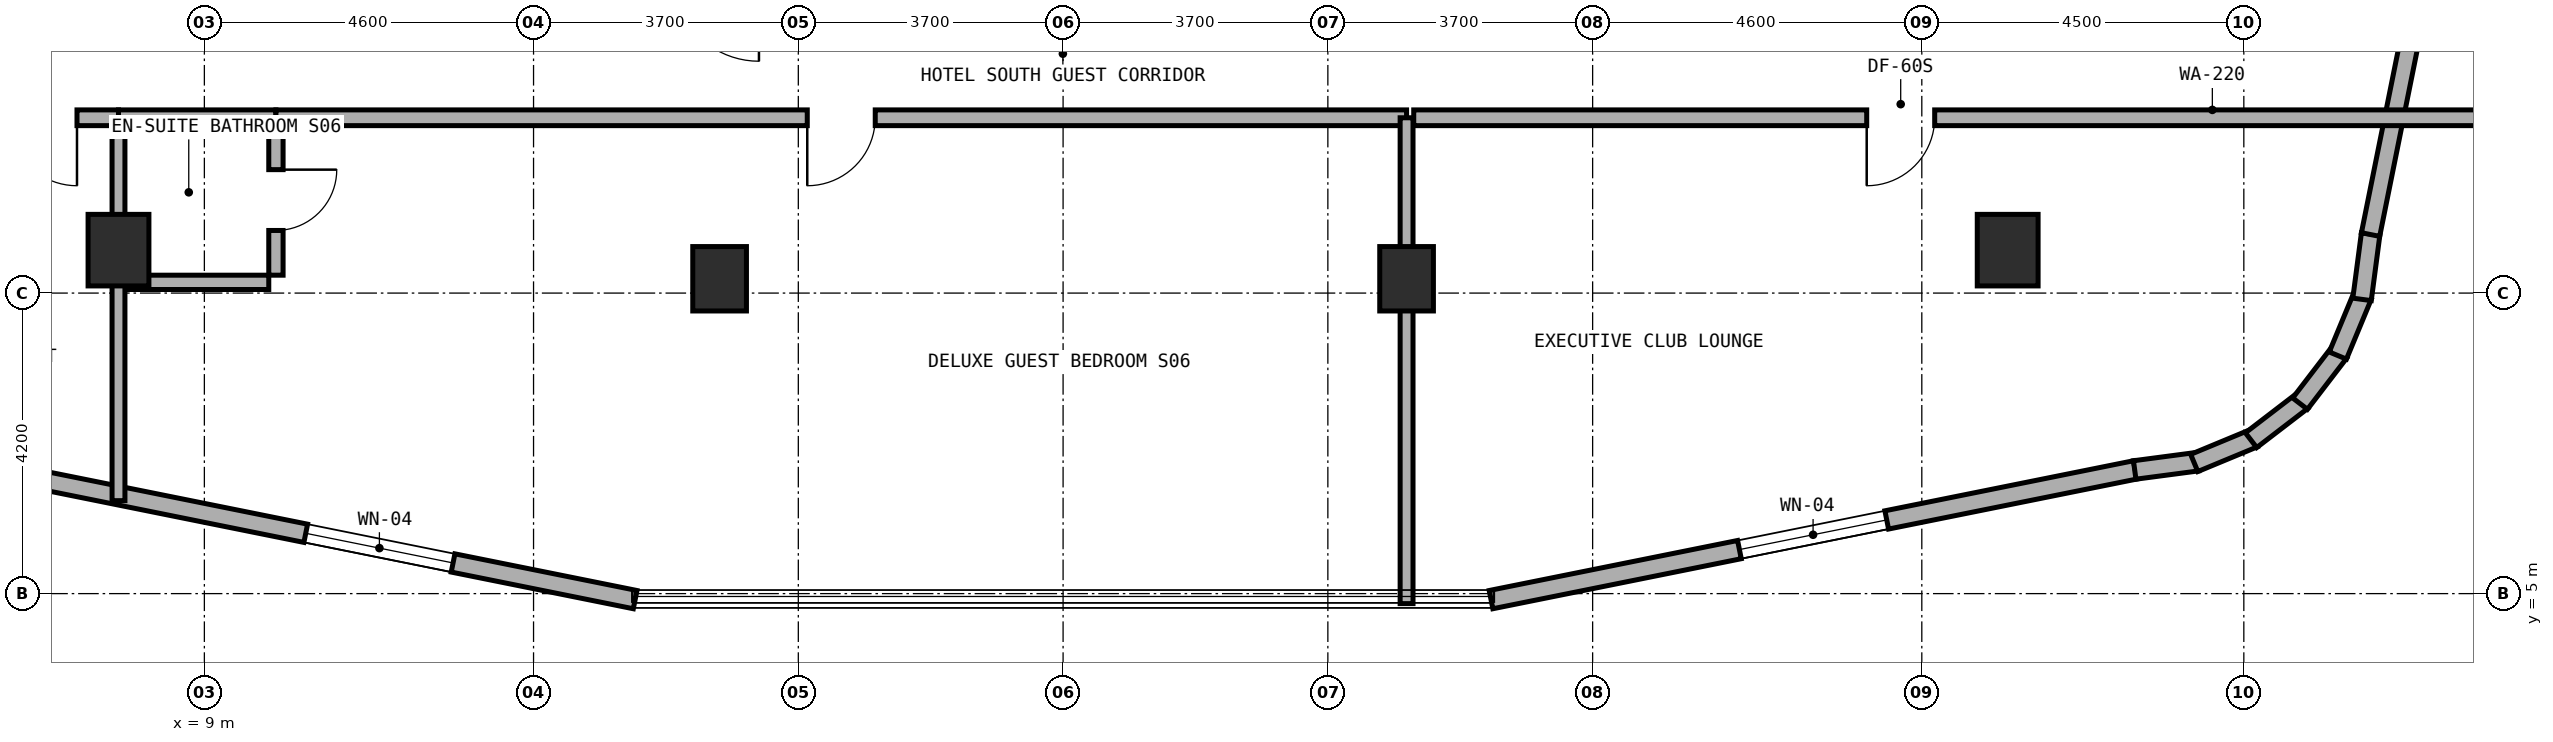
"""IFC4 building model, lengths in metres.
Left out: names, types, materials, properties, quantities, classifications, styles, units other than length and angle.
Written with IfcOpenShell. Run it as: python <this file> out.ifc"""

import sys

from ifc_helpers import new_model, si_unit, direction, frame, frame_2d, origin, origin_2d, place, context, subcontext, project, spatial, rectangle, extrude, element, fill, save


model = new_model("IFC4")
c1 = context("Model", 3, precision=1e-05, world=origin(), true_north=direction((0.0, 1.0)))
c2 = subcontext(c1, "Body", "Model", "MODEL_VIEW")
j1 = project(units=[si_unit("LENGTHUNIT", "METRE"), si_unit("PLANEANGLEUNIT", "RADIAN")], contexts=[c1])
p1 = place(None, origin())
s1 = spatial("IfcSite", under=j1, at=p1, CompositionType="ELEMENT")
p2 = place(p1, origin())
s2 = spatial("IfcBuilding", under=s1, at=p2, CompositionType="ELEMENT")
p3 = place(p2, frame((0.0, 0.0, 152.0)))
s3 = spatial("IfcBuildingStorey", under=s2, at=p3, CompositionType="ELEMENT", Elevation=152.0)
for number, where, z_axis, x_axis in (
    (1, (16.2, 9.4, 0.0), (0.0, 0.0, 1.0), (1.0, 0.0, 0.0)),
    (2, (25.8, 9.4, 0.0), (0.0, 0.0, 1.0), (1.0, 0.0, 0.0)),
):
    element("IfcColumn", number, at=place(p3, frame(where, z_axis=z_axis, x_axis=x_axis)), inside=s3, PredefinedType="COLUMN", context=c2, shape_type="SweptSolid", body=[
        extrude(rectangle(XDim=0.75, YDim=0.9, at=origin_2d()), origin(), (0.0, 0.0, 1.0), 3.5),
    ])
for number, where, z_axis, x_axis in (
    (3, (7.8, 9.8, 0.0), (0.0, 0.0, 1.0), (1.0, 0.0, 0.0)),
    (4, (34.2, 9.8, 0.0), (0.0, 0.0, 1.0), (1.0, 0.0, 0.0)),
):
    element("IfcColumn", number, at=place(p3, frame(where, z_axis=z_axis, x_axis=x_axis)), inside=s3, PredefinedType="COLUMN", context=c2, shape_type="SweptSolid", body=[
        extrude(rectangle(XDim=0.85, YDim=1.0, at=origin_2d()), origin(), (0.0, 0.0, 1.0), 3.5),
    ])
p4 = place(p3, frame((6.018, 6.729, 0.0), z_axis=(0.0, 0.0, 1.0), x_axis=(0.980315963543, -0.197435082048, 0.0)))
e5 = element("IfcWall", 5, at=p4, inside=s3, PredefinedType="STANDARD", context=c2, shape_type="SweptSolid", body=[
    extrude(rectangle(XDim=9.183, YDim=0.26, at=frame_2d((4.591, 0.0))), origin(), (0.0, 0.0, 1.0), 3.22),
])
p5 = place(p4, frame((4.487, 0.0, 0.85)))
e6 = element("IfcOpeningElement", 6, at=p5, cuts=e5, PredefinedType="OPENING", context=c2, shape_type="SweptSolid", body=[
    extrude(rectangle(XDim=2.1, YDim=1.5, at=frame_2d((1.05, 0.75))), frame((0.0, 0.14, 0.0), z_axis=(0.0, -1.0, 0.0), x_axis=(1.0, 0.0, 0.0)), (0.0, 0.0, 1.0), 0.28),
])
p6 = place(p3, frame((26.98, 4.916, 0.0), z_axis=(0.0, 0.0, 1.0), x_axis=(0.980315963543, 0.197435082048, 0.0)))
e7 = element("IfcWall", 7, at=p6, inside=s3, PredefinedType="STANDARD", context=c2, shape_type="SweptSolid", body=[
    extrude(rectangle(XDim=9.183, YDim=0.26, at=frame_2d((4.591, 0.0))), origin(), (0.0, 0.0, 1.0), 3.22),
])
p7 = place(p6, frame((3.541, 0.0, 0.85)))
e8 = element("IfcOpeningElement", 8, at=p7, cuts=e7, PredefinedType="OPENING", context=c2, shape_type="SweptSolid", body=[
    extrude(rectangle(XDim=2.1, YDim=1.5, at=frame_2d((1.05, 0.75))), frame((0.0, 0.14, 0.0), z_axis=(0.0, -1.0, 0.0), x_axis=(1.0, 0.0, 0.0)), (0.0, 0.0, 1.0), 0.28),
])
p8 = place(p3, frame((35.975, 6.728, 0.0), z_axis=(0.0, 0.0, 1.0), x_axis=(0.991388484223, 0.130953706898, 0.0)))
e9 = element("IfcWall", 9, at=p8, inside=s3, PredefinedType="STANDARD", context=c2, shape_type="SweptSolid", body=[
    extrude(rectangle(XDim=0.885, YDim=0.26, at=frame_2d((0.443, 0.0))), origin(), (0.0, 0.0, 1.0), 3.22),
])
p9 = place(p3, frame((36.807, 6.826, 0.0), z_axis=(0.0, 0.0, 1.0), x_axis=(0.923627776508, 0.383290660547, 0.0)))
e10 = element("IfcWall", 10, at=p9, inside=s3, PredefinedType="STANDARD", context=c2, shape_type="SweptSolid", body=[
    extrude(rectangle(XDim=0.903, YDim=0.26, at=frame_2d((0.452, 0.0))), origin(), (0.0, 0.0, 1.0), 3.22),
])
p10 = place(p3, frame((37.601, 7.144, 0.0), z_axis=(0.0, 0.0, 1.0), x_axis=(0.793458244748, 0.608624690463, 0.0)))
e11 = element("IfcWall", 11, at=p10, inside=s3, PredefinedType="STANDARD", context=c2, shape_type="SweptSolid", body=[
    extrude(rectangle(XDim=0.902, YDim=0.26, at=frame_2d((0.451, 0.0))), origin(), (0.0, 0.0, 1.0), 3.22),
])
p11 = place(p3, frame((38.286, 7.655, 0.0), z_axis=(0.0, 0.0, 1.0), x_axis=(0.608494022858, 0.793558456666, 0.0)))
e12 = element("IfcWall", 12, at=p11, inside=s3, PredefinedType="STANDARD", context=c2, shape_type="SweptSolid", body=[
    extrude(rectangle(XDim=0.902, YDim=0.26, at=frame_2d((0.451, 0.0))), origin(), (0.0, 0.0, 1.0), 3.22),
])
p12 = place(p3, frame((38.814, 8.327, 0.0), z_axis=(0.0, 0.0, 1.0), x_axis=(0.383155708213, 0.923683767999, 0.0)))
e13 = element("IfcWall", 13, at=p12, inside=s3, PredefinedType="STANDARD", context=c2, shape_type="SweptSolid", body=[
    extrude(rectangle(XDim=0.903, YDim=0.26, at=frame_2d((0.451, 0.0))), origin(), (0.0, 0.0, 1.0), 3.22),
])
p13 = place(p3, frame((39.152, 9.112, 0.0), z_axis=(0.0, 0.0, 1.0), x_axis=(0.130200706103, 0.991487658083, 0.0)))
e14 = element("IfcWall", 14, at=p13, inside=s3, PredefinedType="STANDARD", context=c2, shape_type="SweptSolid", body=[
    extrude(rectangle(XDim=0.921, YDim=0.26, at=frame_2d((0.46, 0.0))), origin(), (0.0, 0.0, 1.0), 3.22),
])
p14 = place(p3, frame((39.271, 10.018, 0.0), z_axis=(0.0, 0.0, 1.0), x_axis=(0.197435082048, 0.980315963543, 0.0)))
e15 = element("IfcWall", 15, at=p14, inside=s3, PredefinedType="STANDARD", context=c2, shape_type="SweptSolid", body=[
    extrude(rectangle(XDim=9.183, YDim=0.26, at=frame_2d((4.591, 0.0))), origin(), (0.0, 0.0, 1.0), 3.22),
])
p15 = place(p14, frame((5.349, 0.0, 0.85)))
e16 = element("IfcOpeningElement", 16, at=p15, cuts=e15, PredefinedType="OPENING", context=c2, shape_type="SweptSolid", body=[
    extrude(rectangle(XDim=2.1, YDim=1.5, at=frame_2d((1.05, 0.75))), frame((0.0, 0.14, 0.0), z_axis=(0.0, -1.0, 0.0), x_axis=(1.0, 0.0, 0.0)), (0.0, 0.0, 1.0), 0.28),
])
p16 = place(p3, frame((5.55, 11.65, 0.0), z_axis=(0.0, 0.0, 1.0), x_axis=(1.0, 0.0, 0.0)))
e17 = element("IfcWall", 17, at=p16, inside=s3, PredefinedType="SOLIDWALL", context=c2, shape_type="SweptSolid", body=[
    extrude(rectangle(XDim=2.25, YDim=0.22, at=frame_2d((1.125, 0.0))), origin(), (0.0, 0.0, 1.0), 2.795),
])
p17 = place(p16, frame((0.72, 0.0, 0.0)))
e18 = element("IfcOpeningElement", 18, at=p17, cuts=e17, PredefinedType="OPENING", context=c2, shape_type="SweptSolid", body=[
    extrude(rectangle(XDim=0.95, YDim=2.1, at=frame_2d((0.475, 1.05))), frame((0.0, 0.12, 0.0), z_axis=(0.0, -1.0, 0.0), x_axis=(1.0, 0.0, 0.0)), (0.0, 0.0, 1.0), 0.24),
])
p18 = place(p3, frame((7.8, 6.299, 0.0), z_axis=(0.0, 0.0, 1.0), x_axis=(0.0, 1.0, 0.0)))
e19 = element("IfcWall", 19, at=p18, inside=s3, PredefinedType="SOLIDWALL", context=c2, shape_type="SweptSolid", body=[
    extrude(rectangle(XDim=5.351, YDim=0.18, at=frame_2d((2.675, 0.0))), origin(), (0.0, 0.0, 1.0), 2.795),
])
p19 = place(p3, frame((10.0, 9.45, 0.0), z_axis=(0.0, 0.0, 1.0), x_axis=(0.0, 1.0, 0.0)))
e20 = element("IfcWall", 20, at=p19, inside=s3, PredefinedType="PLUMBINGWALL", context=c2, shape_type="SweptSolid", body=[
    extrude(rectangle(XDim=2.1, YDim=0.2, at=frame_2d((1.05, 0.0))), origin(), (0.0, 0.0, 1.0), 2.745),
])
p20 = place(p19, frame((0.625, 0.0, 0.0)))
e21 = element("IfcOpeningElement", 21, at=p20, cuts=e20, PredefinedType="OPENING", context=c2, shape_type="SweptSolid", body=[
    extrude(rectangle(XDim=0.85, YDim=2.1, at=frame_2d((0.425, 1.05))), frame((0.0, 0.11, 0.0), z_axis=(0.0, -1.0, 0.0), x_axis=(1.0, 0.0, 0.0)), (0.0, 0.0, 1.0), 0.22),
])
p21 = place(p3, frame((7.9, 9.35, 0.0), z_axis=(0.0, 0.0, 1.0), x_axis=(1.0, 0.0, 0.0)))
e22 = element("IfcWall", 22, at=p21, inside=s3, PredefinedType="PLUMBINGWALL", context=c2, shape_type="SweptSolid", body=[
    extrude(rectangle(XDim=2.0, YDim=0.2, at=frame_2d((1.0, 0.0))), origin(), (0.0, 0.0, 1.0), 3.22),
])
p22 = place(p3, frame((7.8, 11.65, 0.0), z_axis=(0.0, 0.0, 1.0), x_axis=(1.0, 0.0, 0.0)))
e23 = element("IfcWall", 23, at=p22, inside=s3, PredefinedType="SOLIDWALL", context=c2, shape_type="SweptSolid", body=[
    extrude(rectangle(XDim=2.2, YDim=0.22, at=frame_2d((1.1, 0.0))), origin(), (0.0, 0.0, 1.0), 2.795),
])
p23 = place(p3, frame((10.0, 11.65, 0.0), z_axis=(0.0, 0.0, 1.0), x_axis=(1.0, 0.0, 0.0)))
e24 = element("IfcWall", 24, at=p23, inside=s3, PredefinedType="SOLIDWALL", context=c2, shape_type="SweptSolid", body=[
    extrude(rectangle(XDim=15.8, YDim=0.22, at=frame_2d((7.9, 0.0))), origin(), (0.0, 0.0, 1.0), 2.795),
])
p24 = place(p23, frame((7.425, 0.0, 0.0)))
e25 = element("IfcOpeningElement", 25, at=p24, cuts=e24, PredefinedType="OPENING", context=c2, shape_type="SweptSolid", body=[
    extrude(rectangle(XDim=0.95, YDim=2.1, at=frame_2d((0.475, 1.05))), frame((0.0, 0.12, 0.0), z_axis=(0.0, -1.0, 0.0), x_axis=(1.0, 0.0, 0.0)), (0.0, 0.0, 1.0), 0.24),
])
p25 = place(p3, frame((25.8, 4.86, 0.0), z_axis=(0.0, 0.0, 1.0), x_axis=(0.0, 1.0, 0.0)))
e26 = element("IfcWall", 26, at=p25, inside=s3, PredefinedType="SOLIDWALL", context=c2, shape_type="SweptSolid", body=[
    extrude(rectangle(XDim=6.79, YDim=0.18, at=frame_2d((3.395, 0.0))), origin(), (0.0, 0.0, 1.0), 2.795),
])
p26 = place(p3, frame((25.9, 11.65, 0.0), z_axis=(0.0, 0.0, 1.0), x_axis=(1.0, 0.0, 0.0)))
e27 = element("IfcWall", 27, at=p26, inside=s3, PredefinedType="SOLIDWALL", context=c2, shape_type="SweptSolid", body=[
    extrude(rectangle(XDim=15.04, YDim=0.22, at=frame_2d((7.52, 0.0))), origin(), (0.0, 0.0, 1.0), 2.795),
])
p27 = place(p26, frame((6.33, 0.0, 0.0)))
e28 = element("IfcOpeningElement", 28, at=p27, cuts=e27, PredefinedType="OPENING", context=c2, shape_type="SweptSolid", body=[
    extrude(rectangle(XDim=0.95, YDim=2.1, at=frame_2d((0.475, 1.05))), frame((0.0, 0.12, 0.0), z_axis=(0.0, -1.0, 0.0), x_axis=(1.0, 0.0, 0.0)), (0.0, 0.0, 1.0), 0.24),
])
p28 = place(p5, origin())
e29 = element("IfcWindow", 29, at=p28, inside=s3, PartitioningType="SINGLE_PANEL", PredefinedType="WINDOW", context=c2, shape_type="SweptSolid", body=[
    extrude(rectangle(XDim=2.1, YDim=1.5, at=frame_2d((1.05, 0.75))), frame((0.0, 0.03, 0.0), z_axis=(0.0, -1.0, 0.0), x_axis=(1.0, 0.0, 0.0)), (0.0, 0.0, 1.0), 0.06),
])
fill(e6, e29)
p29 = place(p7, origin())
e30 = element("IfcWindow", 30, at=p29, inside=s3, PartitioningType="SINGLE_PANEL", PredefinedType="WINDOW", context=c2, shape_type="SweptSolid", body=[
    extrude(rectangle(XDim=2.1, YDim=1.5, at=frame_2d((1.05, 0.75))), frame((0.0, 0.03, 0.0), z_axis=(0.0, -1.0, 0.0), x_axis=(1.0, 0.0, 0.0)), (0.0, 0.0, 1.0), 0.06),
])
fill(e8, e30)
p30 = place(p17, frame((0.95, 0.0, 0.0), z_axis=(0.0, 0.0, 1.0), x_axis=(-1.0, 0.0, 0.0)))
e31 = element("IfcDoor", 31, at=p30, inside=s3, OperationType="SINGLE_SWING_LEFT", PredefinedType="DOOR", context=c2, shape_type="SweptSolid", body=[
    extrude(rectangle(XDim=0.95, YDim=2.1, at=frame_2d((0.475, 1.05))), frame((0.0, 0.025, 0.0), z_axis=(0.0, -1.0, 0.0), x_axis=(1.0, 0.0, 0.0)), (0.0, 0.0, 1.0), 0.05),
])
fill(e18, e31)
p31 = place(p20, frame((0.85, 0.0, 0.0), z_axis=(0.0, 0.0, 1.0), x_axis=(-1.0, 0.0, 0.0)))
e32 = element("IfcDoor", 32, at=p31, inside=s3, OperationType="SINGLE_SWING_LEFT", PredefinedType="DOOR", context=c2, shape_type="SweptSolid", body=[
    extrude(rectangle(XDim=0.85, YDim=2.1, at=frame_2d((0.425, 1.05))), frame((0.0, 0.025, 0.0), z_axis=(0.0, -1.0, 0.0), x_axis=(1.0, 0.0, 0.0)), (0.0, 0.0, 1.0), 0.05),
])
fill(e21, e32)
p32 = place(p24, frame((0.95, 0.0, 0.0), z_axis=(0.0, 0.0, 1.0), x_axis=(-1.0, 0.0, 0.0)))
e33 = element("IfcDoor", 33, at=p32, inside=s3, OperationType="SINGLE_SWING_RIGHT", PredefinedType="DOOR", context=c2, shape_type="SweptSolid", body=[
    extrude(rectangle(XDim=0.95, YDim=2.1, at=frame_2d((0.475, 1.05))), frame((0.0, 0.025, 0.0), z_axis=(0.0, -1.0, 0.0), x_axis=(1.0, 0.0, 0.0)), (0.0, 0.0, 1.0), 0.05),
])
fill(e25, e33)
p33 = place(p27, frame((0.95, 0.0, 0.0), z_axis=(0.0, 0.0, 1.0), x_axis=(-1.0, 0.0, 0.0)))
e34 = element("IfcDoor", 34, at=p33, inside=s3, OperationType="SINGLE_SWING_RIGHT", PredefinedType="DOOR", context=c2, shape_type="SweptSolid", body=[
    extrude(rectangle(XDim=0.95, YDim=2.1, at=frame_2d((0.475, 1.05))), frame((0.0, 0.025, 0.0), z_axis=(0.0, -1.0, 0.0), x_axis=(1.0, 0.0, 0.0)), (0.0, 0.0, 1.0), 0.05),
])
fill(e28, e34)
save(model, sys.argv[1])
